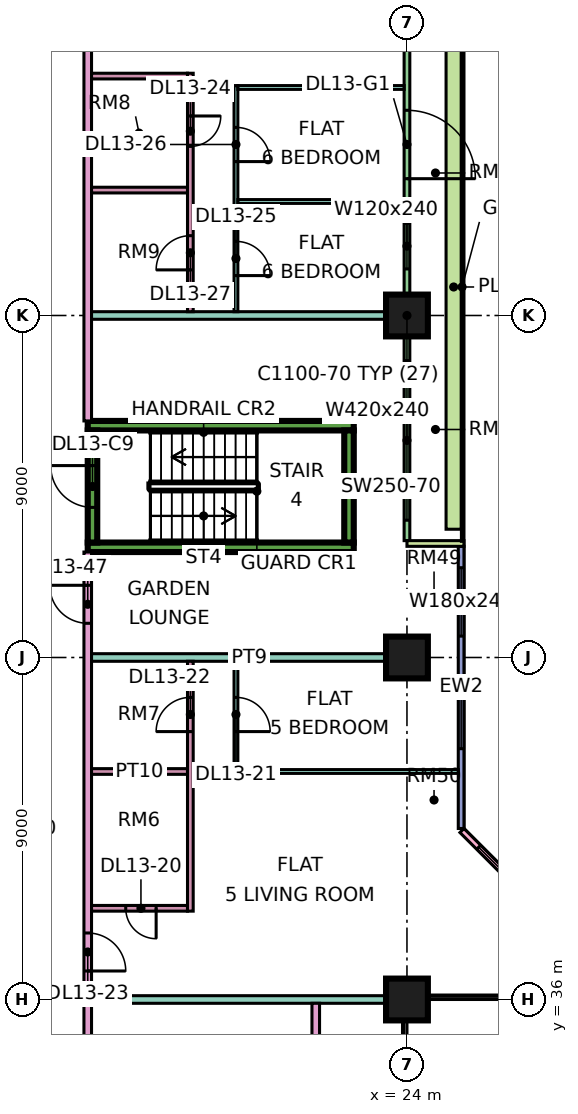
"""IFC4 building model, lengths in metres.
Left out: names, types, materials, properties, quantities, classifications, styles, units other than length and angle.
Written with IfcOpenShell. Run it as: python <this file> out.ifc"""

import sys

from ifc_helpers import new_model, si_unit, direction, frame, frame_2d, origin, origin_2d, place, context, subcontext, project, spatial, rectangle, extrude, element, fill, save


model = new_model("IFC4")
c1 = context("Model", 3, precision=1e-05, world=origin(), true_north=direction((0.0, 1.0)))
c2 = subcontext(c1, "Body", "Model", "MODEL_VIEW")
j1 = project(units=[si_unit("LENGTHUNIT", "METRE"), si_unit("PLANEANGLEUNIT", "RADIAN")], contexts=[c1])
p1 = place(None, origin())
s1 = spatial("IfcSite", under=j1, at=p1, CompositionType="ELEMENT")
p2 = place(p1, origin())
s2 = spatial("IfcBuilding", under=s1, at=p2, CompositionType="ELEMENT")
p3 = place(p2, frame((0.0, 0.0, 63.9)))
s3 = spatial("IfcBuildingStorey", under=s2, at=p3, CompositionType="ELEMENT", Elevation=63.9)
for number, where, z_axis, x_axis in (
    (1, (24.0, 36.0, 0.0), (0.0, 0.0, 1.0), (1.0, 0.0, 0.0)),
    (2, (24.0, 45.0, 0.0), (0.0, 0.0, 1.0), (1.0, 0.0, 0.0)),
    (3, (24.0, 54.0, 0.0), (0.0, 0.0, 1.0), (1.0, 0.0, 0.0)),
):
    element("IfcColumn", number, at=place(p3, frame(where, z_axis=z_axis, x_axis=x_axis)), inside=s3, PredefinedType="COLUMN", context=c2, shape_type="SweptSolid", body=[
        extrude(rectangle(XDim=1.1, YDim=1.1, at=origin_2d()), origin(), (0.0, 0.0, 1.0), 3.75),
    ])
for number, where, z_axis, x_axis in (
    (4, (15.6, 47.9, 0.0), (0.0, 0.0, 1.0), (1.0, 0.0, 0.0)),
    (5, (15.6, 51.1, 0.0), (0.0, 0.0, 1.0), (1.0, 0.0, 0.0)),
):
    element("IfcWall", number, at=place(p3, frame(where, z_axis=z_axis, x_axis=x_axis)), inside=s3, PredefinedType="SHEAR", context=c2, shape_type="SweptSolid", body=[
        extrude(rectangle(XDim=7.0, YDim=0.25, at=frame_2d((3.5, 0.0))), origin(), (0.0, 0.0, 1.0), 3.75),
    ])
p4 = place(p3, frame((15.725, 48.025, 0.0), z_axis=(0.0, 0.0, 1.0), x_axis=(0.0, 1.0, 0.0)))
e6 = element("IfcWall", 6, at=p4, inside=s3, PredefinedType="SHEAR", context=c2, shape_type="SweptSolid", body=[
    extrude(rectangle(XDim=2.95, YDim=0.25, at=frame_2d((1.475, 0.0))), origin(), (0.0, 0.0, 1.0), 3.75),
])
p5 = place(p4, frame((0.925, 0.0, 0.0)))
e7 = element("IfcOpeningElement", 7, at=p5, cuts=e6, PredefinedType="OPENING", context=c2, shape_type="SweptSolid", body=[
    extrude(rectangle(XDim=1.1, YDim=2.2, at=frame_2d((0.55, 1.1))), frame((0.0, 0.135, 0.0), z_axis=(0.0, -1.0, 0.0), x_axis=(1.0, 0.0, 0.0)), (0.0, 0.0, 1.0), 0.27),
])
p6 = place(p3, frame((22.475, 48.025, 0.0), z_axis=(0.0, 0.0, 1.0), x_axis=(0.0, 1.0, 0.0)))
e8 = element("IfcWall", 8, at=p6, inside=s3, PredefinedType="SHEAR", context=c2, shape_type="SweptSolid", body=[
    extrude(rectangle(XDim=2.95, YDim=0.25, at=frame_2d((1.475, 0.0))), origin(), (0.0, 0.0, 1.0), 3.75),
])
p7 = place(p3, frame((28.447, 37.447, 0.0), z_axis=(0.0, 0.0, 1.0), x_axis=(-0.707106781187, 0.707106781187, 0.0)))
e9 = element("IfcWall", 9, at=p7, inside=s3, PredefinedType="SOLIDWALL", context=c2, shape_type="SweptSolid", body=[
    extrude(rectangle(XDim=4.243, YDim=0.15, at=frame_2d((2.121, 0.0))), origin(), (0.0, 0.0, 1.0), 3.35),
])
p8 = place(p7, frame((0.621, 0.0, 0.45)))
e10 = element("IfcOpeningElement", 10, at=p8, cuts=e9, PredefinedType="OPENING", context=c2, shape_type="SweptSolid", body=[
    extrude(rectangle(XDim=3.0, YDim=2.4, at=frame_2d((1.5, 1.2))), frame((0.0, 0.085, 0.0), z_axis=(0.0, -1.0, 0.0), x_axis=(1.0, 0.0, 0.0)), (0.0, 0.0, 1.0), 0.17),
])
p9 = place(p3, frame((25.425, 40.5, 0.0), z_axis=(0.0, 0.0, 1.0), x_axis=(0.0, 1.0, 0.0)))
e11 = element("IfcWall", 11, at=p9, inside=s3, PredefinedType="SOLIDWALL", context=c2, shape_type="SweptSolid", body=[
    extrude(rectangle(XDim=7.425, YDim=0.15, at=frame_2d((3.712, 0.0))), origin(), (0.0, 0.0, 1.0), 3.35),
])
p10 = place(p9, frame((2.1, 0.0, 0.45)))
e12 = element("IfcOpeningElement", 12, at=p10, cuts=e11, PredefinedType="OPENING", context=c2, shape_type="SweptSolid", body=[
    extrude(rectangle(XDim=1.8, YDim=2.4, at=frame_2d((0.9, 1.2))), frame((0.0, 0.085, 0.0), z_axis=(0.0, -1.0, 0.0), x_axis=(1.0, 0.0, 0.0)), (0.0, 0.0, 1.0), 0.17),
])
p11 = place(p9, frame((5.062, 0.0, 0.45)))
e13 = element("IfcOpeningElement", 13, at=p11, cuts=e11, PredefinedType="OPENING", context=c2, shape_type="SweptSolid", body=[
    extrude(rectangle(XDim=1.8, YDim=2.4, at=frame_2d((0.9, 1.2))), frame((0.0, 0.085, 0.0), z_axis=(0.0, -1.0, 0.0), x_axis=(1.0, 0.0, 0.0)), (0.0, 0.0, 1.0), 0.17),
])
p12 = place(p3, frame((24.0, 48.075, 0.0), z_axis=(0.0, 0.0, 1.0), x_axis=(0.0, 1.0, 0.0)))
e14 = element("IfcWall", 14, at=p12, inside=s3, PredefinedType="SOLIDWALL", context=c2, shape_type="SweptSolid", body=[
    extrude(rectangle(XDim=13.35, YDim=0.15, at=frame_2d((6.675, 0.0))), origin(), (0.0, 0.0, 1.0), 3.35),
])
p13 = place(p12, frame((0.538, 0.0, 0.45)))
e15 = element("IfcOpeningElement", 15, at=p13, cuts=e14, PredefinedType="OPENING", context=c2, shape_type="SweptSolid", body=[
    extrude(rectangle(XDim=4.2, YDim=2.4, at=frame_2d((2.1, 1.2))), frame((0.0, 0.085, 0.0), z_axis=(0.0, -1.0, 0.0), x_axis=(1.0, 0.0, 0.0)), (0.0, 0.0, 1.0), 0.17),
])
p14 = place(p12, frame((7.15, 0.0, 0.45)))
e16 = element("IfcOpeningElement", 16, at=p14, cuts=e14, PredefinedType="OPENING", context=c2, shape_type="SweptSolid", body=[
    extrude(rectangle(XDim=1.2, YDim=2.4, at=frame_2d((0.6, 1.2))), frame((0.0, 0.085, 0.0), z_axis=(0.0, -1.0, 0.0), x_axis=(1.0, 0.0, 0.0)), (0.0, 0.0, 1.0), 0.17),
])
p15 = place(p12, frame((9.525, 0.0, 0.0)))
e17 = element("IfcOpeningElement", 17, at=p15, cuts=e14, PredefinedType="OPENING", context=c2, shape_type="SweptSolid", body=[
    extrude(rectangle(XDim=1.8, YDim=2.4, at=frame_2d((0.9, 1.2))), frame((0.0, 0.085, 0.0), z_axis=(0.0, -1.0, 0.0), x_axis=(1.0, 0.0, 0.0)), (0.0, 0.0, 1.0), 0.17),
])
p16 = place(p3, frame((25.5, 48.0, 0.0), z_axis=(0.0, 0.0, 1.0), x_axis=(-1.0, 0.0, 0.0)))
e18 = element("IfcWall", 18, at=p16, inside=s3, PredefinedType="SOLIDWALL", context=c2, shape_type="SweptSolid", body=[
    extrude(rectangle(XDim=1.5, YDim=0.15, at=frame_2d((0.75, 0.0))), origin(), (0.0, 0.0, 1.0), 3.35),
])
p17 = place(p3, frame((25.229, 48.375, 0.0), z_axis=(0.0, 0.0, 1.0), x_axis=(0.0, 1.0, 0.0)))
e19 = element("IfcWall", 19, at=p17, inside=s3, PredefinedType="SOLIDWALL", context=c2, shape_type="SweptSolid", body=[
    extrude(rectangle(XDim=12.75, YDim=0.4, at=frame_2d((6.375, 0.0))), origin(), (0.0, 0.0, 1.0), 0.7),
])
p18 = place(p3, frame((15.6, 20.0, 0.0), z_axis=(0.0, 0.0, 1.0), x_axis=(0.0, 1.0, 0.0)))
e20 = element("IfcWall", 20, at=p18, inside=s3, PredefinedType="PARTITIONING", context=c2, shape_type="SweptSolid", body=[
    extrude(rectangle(XDim=27.775, YDim=0.2, at=frame_2d((13.887, 0.0))), origin(), (0.0, 0.0, 1.0), 3.35),
])
p19 = place(p18, frame((6.55, 0.0, 0.0)))
e21 = element("IfcOpeningElement", 21, at=p19, cuts=e20, PredefinedType="OPENING", context=c2, shape_type="SweptSolid", body=[
    extrude(rectangle(XDim=1.0, YDim=2.1, at=frame_2d((0.5, 1.05))), frame((0.0, 0.11, 0.0), z_axis=(0.0, -1.0, 0.0), x_axis=(1.0, 0.0, 0.0)), (0.0, 0.0, 1.0), 0.22),
])
p20 = place(p18, frame((12.25, 0.0, 0.0)))
e22 = element("IfcOpeningElement", 22, at=p20, cuts=e20, PredefinedType="OPENING", context=c2, shape_type="SweptSolid", body=[
    extrude(rectangle(XDim=1.6, YDim=2.1, at=frame_2d((0.8, 1.05))), frame((0.0, 0.11, 0.0), z_axis=(0.0, -1.0, 0.0), x_axis=(1.0, 0.0, 0.0)), (0.0, 0.0, 1.0), 0.22),
])
p21 = place(p18, frame((16.75, 0.0, 0.0)))
e23 = element("IfcOpeningElement", 23, at=p21, cuts=e20, PredefinedType="OPENING", context=c2, shape_type="SweptSolid", body=[
    extrude(rectangle(XDim=1.0, YDim=2.1, at=frame_2d((0.5, 1.05))), frame((0.0, 0.11, 0.0), z_axis=(0.0, -1.0, 0.0), x_axis=(1.0, 0.0, 0.0)), (0.0, 0.0, 1.0), 0.22),
])
p22 = place(p18, frame((1.15, 0.0, 0.0)))
e24 = element("IfcOpeningElement", 24, at=p22, cuts=e20, PredefinedType="OPENING", context=c2, shape_type="SweptSolid", body=[
    extrude(rectangle(XDim=1.8, YDim=2.1, at=frame_2d((0.9, 1.05))), frame((0.0, 0.11, 0.0), z_axis=(0.0, -1.0, 0.0), x_axis=(1.0, 0.0, 0.0)), (0.0, 0.0, 1.0), 0.22),
])
p23 = place(p18, frame((25.9, 0.0, 0.0)))
e25 = element("IfcOpeningElement", 25, at=p23, cuts=e20, PredefinedType="OPENING", context=c2, shape_type="SweptSolid", body=[
    extrude(rectangle(XDim=1.0, YDim=2.1, at=frame_2d((0.5, 1.05))), frame((0.0, 0.11, 0.0), z_axis=(0.0, -1.0, 0.0), x_axis=(1.0, 0.0, 0.0)), (0.0, 0.0, 1.0), 0.22),
])
p24 = place(p3, frame((15.6, 51.225, 0.0), z_axis=(0.0, 0.0, 1.0), x_axis=(0.0, 1.0, 0.0)))
e26 = element("IfcWall", 26, at=p24, inside=s3, PredefinedType="PARTITIONING", context=c2, shape_type="SweptSolid", body=[
    extrude(rectangle(XDim=13.125, YDim=0.2, at=frame_2d((6.562, 0.0))), origin(), (0.0, 0.0, 1.0), 3.35),
])
p25 = place(p24, frame((9.975, 0.0, 0.0)))
e27 = element("IfcOpeningElement", 27, at=p25, cuts=e26, PredefinedType="OPENING", context=c2, shape_type="SweptSolid", body=[
    extrude(rectangle(XDim=1.0, YDim=2.1, at=frame_2d((0.5, 1.05))), frame((0.0, 0.11, 0.0), z_axis=(0.0, -1.0, 0.0), x_axis=(1.0, 0.0, 0.0)), (0.0, 0.0, 1.0), 0.22),
])
p26 = place(p3, frame((15.7, 36.0, 0.0), z_axis=(0.0, 0.0, 1.0), x_axis=(1.0, 0.0, 0.0)))
e28 = element("IfcWall", 28, at=p26, inside=s3, PredefinedType="PARTITIONING", context=c2, shape_type="SweptSolid", body=[
    extrude(rectangle(XDim=8.3, YDim=0.2, at=frame_2d((4.15, 0.0))), origin(), (0.0, 0.0, 1.0), 3.35),
])
p27 = place(p3, frame((15.7, 38.4, 0.0), z_axis=(0.0, 0.0, 1.0), x_axis=(1.0, 0.0, 0.0)))
e29 = element("IfcWall", 29, at=p27, inside=s3, PredefinedType="PARTITIONING", context=c2, shape_type="SweptSolid", body=[
    extrude(rectangle(XDim=2.525, YDim=0.15, at=frame_2d((1.263, 0.0))), origin(), (0.0, 0.0, 1.0), 3.35),
])
p28 = place(p27, frame((0.9, 0.0, 0.0)))
e30 = element("IfcOpeningElement", 30, at=p28, cuts=e29, PredefinedType="OPENING", context=c2, shape_type="SweptSolid", body=[
    extrude(rectangle(XDim=0.8, YDim=2.1, at=frame_2d((0.4, 1.05))), frame((0.0, 0.085, 0.0), z_axis=(0.0, -1.0, 0.0), x_axis=(1.0, 0.0, 0.0)), (0.0, 0.0, 1.0), 0.17),
])
p29 = place(p3, frame((15.7, 42.0, 0.0), z_axis=(0.0, 0.0, 1.0), x_axis=(1.0, 0.0, 0.0)))
e31 = element("IfcWall", 31, at=p29, inside=s3, PredefinedType="PARTITIONING", context=c2, shape_type="SweptSolid", body=[
    extrude(rectangle(XDim=2.525, YDim=0.15, at=frame_2d((1.263, 0.0))), origin(), (0.0, 0.0, 1.0), 3.35),
])
p30 = place(p3, frame((15.7, 45.0, 0.0), z_axis=(0.0, 0.0, 1.0), x_axis=(1.0, 0.0, 0.0)))
e32 = element("IfcWall", 32, at=p30, inside=s3, PredefinedType="PARTITIONING", context=c2, shape_type="SweptSolid", body=[
    extrude(rectangle(XDim=8.3, YDim=0.2, at=frame_2d((4.15, 0.0))), origin(), (0.0, 0.0, 1.0), 3.35),
])
p31 = place(p3, frame((15.7, 54.0, 0.0), z_axis=(0.0, 0.0, 1.0), x_axis=(1.0, 0.0, 0.0)))
e33 = element("IfcWall", 33, at=p31, inside=s3, PredefinedType="PARTITIONING", context=c2, shape_type="SweptSolid", body=[
    extrude(rectangle(XDim=8.226, YDim=0.2, at=frame_2d((4.113, 0.0))), origin(), (0.0, 0.0, 1.0), 3.35),
])
for number, where, z_axis, x_axis in (
    (34, (15.7, 57.3, 0.0), (0.0, 0.0, 1.0), (1.0, 0.0, 0.0)),
    (35, (15.7, 60.3, 0.0), (0.0, 0.0, 1.0), (1.0, 0.0, 0.0)),
):
    element("IfcWall", number, at=place(p3, frame(where, z_axis=z_axis, x_axis=x_axis)), inside=s3, PredefinedType="PARTITIONING", context=c2, shape_type="SweptSolid", body=[
        extrude(rectangle(XDim=2.525, YDim=0.15, at=frame_2d((1.263, 0.0))), origin(), (0.0, 0.0, 1.0), 3.35),
    ])
p32 = place(p3, frame((18.3, 38.325, 0.0), z_axis=(0.0, 0.0, 1.0), x_axis=(0.0, 1.0, 0.0)))
e36 = element("IfcWall", 36, at=p32, inside=s3, PredefinedType="PARTITIONING", context=c2, shape_type="SweptSolid", body=[
    extrude(rectangle(XDim=6.575, YDim=0.15, at=frame_2d((3.288, 0.0))), origin(), (0.0, 0.0, 1.0), 3.35),
])
p33 = place(p32, frame((4.725, 0.0, 0.0)))
e37 = element("IfcOpeningElement", 37, at=p33, cuts=e36, PredefinedType="OPENING", context=c2, shape_type="SweptSolid", body=[
    extrude(rectangle(XDim=0.9, YDim=2.1, at=frame_2d((0.45, 1.05))), frame((0.0, 0.085, 0.0), z_axis=(0.0, -1.0, 0.0), x_axis=(1.0, 0.0, 0.0)), (0.0, 0.0, 1.0), 0.17),
])
p34 = place(p3, frame((18.3, 54.1, 0.0), z_axis=(0.0, 0.0, 1.0), x_axis=(0.0, 1.0, 0.0)))
e38 = element("IfcWall", 38, at=p34, inside=s3, PredefinedType="PARTITIONING", context=c2, shape_type="SweptSolid", body=[
    extrude(rectangle(XDim=6.275, YDim=0.15, at=frame_2d((3.137, 0.0))), origin(), (0.0, 0.0, 1.0), 3.35),
])
p35 = place(p34, frame((4.35, 0.0, 0.0)))
e39 = element("IfcOpeningElement", 39, at=p35, cuts=e38, PredefinedType="OPENING", context=c2, shape_type="SweptSolid", body=[
    extrude(rectangle(XDim=0.8, YDim=2.1, at=frame_2d((0.4, 1.05))), frame((0.0, 0.085, 0.0), z_axis=(0.0, -1.0, 0.0), x_axis=(1.0, 0.0, 0.0)), (0.0, 0.0, 1.0), 0.17),
])
p36 = place(p34, frame((1.1, 0.0, 0.0)))
e40 = element("IfcOpeningElement", 40, at=p36, cuts=e38, PredefinedType="OPENING", context=c2, shape_type="SweptSolid", body=[
    extrude(rectangle(XDim=0.9, YDim=2.1, at=frame_2d((0.45, 1.05))), frame((0.0, 0.085, 0.0), z_axis=(0.0, -1.0, 0.0), x_axis=(1.0, 0.0, 0.0)), (0.0, 0.0, 1.0), 0.17),
])
p37 = place(p3, frame((19.45, 42.0, 0.0), z_axis=(0.0, 0.0, 1.0), x_axis=(1.0, 0.0, 0.0)))
e41 = element("IfcWall", 41, at=p37, inside=s3, PredefinedType="PARTITIONING", context=c2, shape_type="SweptSolid", body=[
    extrude(rectangle(XDim=5.9, YDim=0.1, at=frame_2d((2.95, 0.0))), origin(), (0.0, 0.0, 1.0), 3.35),
])
p38 = place(p3, frame((19.5, 42.05, 0.0), z_axis=(0.0, 0.0, 1.0), x_axis=(0.0, 1.0, 0.0)))
e42 = element("IfcWall", 42, at=p38, inside=s3, PredefinedType="PARTITIONING", context=c2, shape_type="SweptSolid", body=[
    extrude(rectangle(XDim=2.85, YDim=0.1, at=frame_2d((1.425, 0.0))), origin(), (0.0, 0.0, 1.0), 3.35),
])
p39 = place(p38, frame((1.0, 0.0, 0.0)))
e43 = element("IfcOpeningElement", 43, at=p39, cuts=e42, PredefinedType="OPENING", context=c2, shape_type="SweptSolid", body=[
    extrude(rectangle(XDim=0.9, YDim=2.1, at=frame_2d((0.45, 1.05))), frame((0.0, 0.06, 0.0), z_axis=(0.0, -1.0, 0.0), x_axis=(1.0, 0.0, 0.0)), (0.0, 0.0, 1.0), 0.12),
])
p40 = place(p3, frame((19.5, 54.1, 0.0), z_axis=(0.0, 0.0, 1.0), x_axis=(0.0, 1.0, 0.0)))
e44 = element("IfcWall", 44, at=p40, inside=s3, PredefinedType="PARTITIONING", context=c2, shape_type="SweptSolid", body=[
    extrude(rectangle(XDim=5.95, YDim=0.1, at=frame_2d((2.975, 0.0))), origin(), (0.0, 0.0, 1.0), 3.35),
])
p41 = place(p40, frame((0.95, 0.0, 0.0)))
e45 = element("IfcOpeningElement", 45, at=p41, cuts=e44, PredefinedType="OPENING", context=c2, shape_type="SweptSolid", body=[
    extrude(rectangle(XDim=0.9, YDim=2.1, at=frame_2d((0.45, 1.05))), frame((0.0, 0.06, 0.0), z_axis=(0.0, -1.0, 0.0), x_axis=(1.0, 0.0, 0.0)), (0.0, 0.0, 1.0), 0.12),
])
p42 = place(p40, frame((3.95, 0.0, 0.0)))
e46 = element("IfcOpeningElement", 46, at=p42, cuts=e44, PredefinedType="OPENING", context=c2, shape_type="SweptSolid", body=[
    extrude(rectangle(XDim=0.9, YDim=2.1, at=frame_2d((0.45, 1.05))), frame((0.0, 0.06, 0.0), z_axis=(0.0, -1.0, 0.0), x_axis=(1.0, 0.0, 0.0)), (0.0, 0.0, 1.0), 0.12),
])
for number, where, z_axis, x_axis in (
    (47, (19.55, 57.0, 0.0), (0.0, 0.0, 1.0), (1.0, 0.0, 0.0)),
    (48, (19.55, 60.0, 0.0), (0.0, 0.0, 1.0), (1.0, 0.0, 0.0)),
):
    element("IfcWall", number, at=place(p3, frame(where, z_axis=z_axis, x_axis=x_axis)), inside=s3, PredefinedType="PARTITIONING", context=c2, shape_type="SweptSolid", body=[
        extrude(rectangle(XDim=4.376, YDim=0.1, at=frame_2d((2.188, 0.0))), origin(), (0.0, 0.0, 1.0), 3.35),
    ])
p43 = place(p3, frame((21.6, 23.9, 0.0), z_axis=(0.0, 0.0, 1.0), x_axis=(0.0, 1.0, 0.0)))
e49 = element("IfcWall", 49, at=p43, inside=s3, PredefinedType="PARTITIONING", context=c2, shape_type="SweptSolid", body=[
    extrude(rectangle(XDim=12.0, YDim=0.2, at=frame_2d((6.0, 0.0))), origin(), (0.0, 0.0, 1.0), 3.35),
])
p44 = place(p8, origin())
e50 = element("IfcWindow", 50, at=p44, inside=s3, PartitioningType="SINGLE_PANEL", PredefinedType="WINDOW", context=c2, shape_type="SweptSolid", body=[
    extrude(rectangle(XDim=3.0, YDim=2.4, at=frame_2d((1.5, 1.2))), frame((0.0, 0.03, 0.0), z_axis=(0.0, -1.0, 0.0), x_axis=(1.0, 0.0, 0.0)), (0.0, 0.0, 1.0), 0.06),
])
fill(e10, e50)
p45 = place(p10, origin())
e51 = element("IfcWindow", 51, at=p45, inside=s3, PartitioningType="SINGLE_PANEL", PredefinedType="WINDOW", context=c2, shape_type="SweptSolid", body=[
    extrude(rectangle(XDim=1.8, YDim=2.4, at=frame_2d((0.9, 1.2))), frame((0.0, 0.03, 0.0), z_axis=(0.0, -1.0, 0.0), x_axis=(1.0, 0.0, 0.0)), (0.0, 0.0, 1.0), 0.06),
])
fill(e12, e51)
p46 = place(p11, origin())
e52 = element("IfcWindow", 52, at=p46, inside=s3, PartitioningType="SINGLE_PANEL", PredefinedType="WINDOW", context=c2, shape_type="SweptSolid", body=[
    extrude(rectangle(XDim=1.8, YDim=2.4, at=frame_2d((0.9, 1.2))), frame((0.0, 0.03, 0.0), z_axis=(0.0, -1.0, 0.0), x_axis=(1.0, 0.0, 0.0)), (0.0, 0.0, 1.0), 0.06),
])
fill(e13, e52)
p47 = place(p13, origin())
e53 = element("IfcWindow", 53, at=p47, inside=s3, PartitioningType="SINGLE_PANEL", PredefinedType="WINDOW", context=c2, shape_type="SweptSolid", body=[
    extrude(rectangle(XDim=4.2, YDim=2.4, at=frame_2d((2.1, 1.2))), frame((0.0, 0.03, 0.0), z_axis=(0.0, -1.0, 0.0), x_axis=(1.0, 0.0, 0.0)), (0.0, 0.0, 1.0), 0.06),
])
fill(e15, e53)
p48 = place(p14, origin())
e54 = element("IfcWindow", 54, at=p48, inside=s3, PartitioningType="SINGLE_PANEL", PredefinedType="WINDOW", context=c2, shape_type="SweptSolid", body=[
    extrude(rectangle(XDim=1.2, YDim=2.4, at=frame_2d((0.6, 1.2))), frame((0.0, 0.03, 0.0), z_axis=(0.0, -1.0, 0.0), x_axis=(1.0, 0.0, 0.0)), (0.0, 0.0, 1.0), 0.06),
])
fill(e16, e54)
p49 = place(p15, frame((1.8, 0.0, 0.0), z_axis=(0.0, 0.0, 1.0), x_axis=(-1.0, 0.0, 0.0)))
e55 = element("IfcDoor", 55, at=p49, inside=s3, OperationType="DOUBLE_DOOR_SINGLE_SWING", PredefinedType="DOOR", context=c2, shape_type="SweptSolid", body=[
    extrude(rectangle(XDim=1.8, YDim=2.4, at=frame_2d((0.9, 1.2))), frame((0.0, 0.025, 0.0), z_axis=(0.0, -1.0, 0.0), x_axis=(1.0, 0.0, 0.0)), (0.0, 0.0, 1.0), 0.05),
])
fill(e17, e55)
p50 = place(p5, frame((1.1, 0.0, 0.0), z_axis=(0.0, 0.0, 1.0), x_axis=(-1.0, 0.0, 0.0)))
e56 = element("IfcDoor", 56, at=p50, inside=s3, OperationType="SINGLE_SWING_RIGHT", PredefinedType="DOOR", context=c2, shape_type="SweptSolid", body=[
    extrude(rectangle(XDim=1.1, YDim=2.2, at=frame_2d((0.55, 1.1))), frame((0.0, 0.025, 0.0), z_axis=(0.0, -1.0, 0.0), x_axis=(1.0, 0.0, 0.0)), (0.0, 0.0, 1.0), 0.05),
])
fill(e7, e56)
p51 = place(p28, origin())
e57 = element("IfcDoor", 57, at=p51, inside=s3, OperationType="SINGLE_SWING_RIGHT", PredefinedType="DOOR", context=c2, shape_type="SweptSolid", body=[
    extrude(rectangle(XDim=0.8, YDim=2.1, at=frame_2d((0.4, 1.05))), frame((0.0, 0.025, 0.0), z_axis=(0.0, -1.0, 0.0), x_axis=(1.0, 0.0, 0.0)), (0.0, 0.0, 1.0), 0.05),
])
fill(e30, e57)
p52 = place(p39, frame((0.9, 0.0, 0.0), z_axis=(0.0, 0.0, 1.0), x_axis=(-1.0, 0.0, 0.0)))
e58 = element("IfcDoor", 58, at=p52, inside=s3, OperationType="SINGLE_SWING_LEFT", PredefinedType="DOOR", context=c2, shape_type="SweptSolid", body=[
    extrude(rectangle(XDim=0.9, YDim=2.1, at=frame_2d((0.45, 1.05))), frame((0.0, 0.025, 0.0), z_axis=(0.0, -1.0, 0.0), x_axis=(1.0, 0.0, 0.0)), (0.0, 0.0, 1.0), 0.05),
])
fill(e43, e58)
p53 = place(p33, origin())
e59 = element("IfcDoor", 59, at=p53, inside=s3, OperationType="SINGLE_SWING_LEFT", PredefinedType="DOOR", context=c2, shape_type="SweptSolid", body=[
    extrude(rectangle(XDim=0.9, YDim=2.1, at=frame_2d((0.45, 1.05))), frame((0.0, 0.025, 0.0), z_axis=(0.0, -1.0, 0.0), x_axis=(1.0, 0.0, 0.0)), (0.0, 0.0, 1.0), 0.05),
])
fill(e37, e59)
p54 = place(p21, frame((1.0, 0.0, 0.0), z_axis=(0.0, 0.0, 1.0), x_axis=(-1.0, 0.0, 0.0)))
e60 = element("IfcDoor", 60, at=p54, inside=s3, OperationType="SINGLE_SWING_LEFT", PredefinedType="DOOR", context=c2, shape_type="SweptSolid", body=[
    extrude(rectangle(XDim=1.0, YDim=2.1, at=frame_2d((0.5, 1.05))), frame((0.0, 0.025, 0.0), z_axis=(0.0, -1.0, 0.0), x_axis=(1.0, 0.0, 0.0)), (0.0, 0.0, 1.0), 0.05),
])
fill(e23, e60)
p55 = place(p35, origin())
e61 = element("IfcDoor", 61, at=p55, inside=s3, OperationType="SINGLE_SWING_RIGHT", PredefinedType="DOOR", context=c2, shape_type="SweptSolid", body=[
    extrude(rectangle(XDim=0.8, YDim=2.1, at=frame_2d((0.4, 1.05))), frame((0.0, 0.025, 0.0), z_axis=(0.0, -1.0, 0.0), x_axis=(1.0, 0.0, 0.0)), (0.0, 0.0, 1.0), 0.05),
])
fill(e39, e61)
p56 = place(p41, frame((0.9, 0.0, 0.0), z_axis=(0.0, 0.0, 1.0), x_axis=(-1.0, 0.0, 0.0)))
e62 = element("IfcDoor", 62, at=p56, inside=s3, OperationType="SINGLE_SWING_LEFT", PredefinedType="DOOR", context=c2, shape_type="SweptSolid", body=[
    extrude(rectangle(XDim=0.9, YDim=2.1, at=frame_2d((0.45, 1.05))), frame((0.0, 0.025, 0.0), z_axis=(0.0, -1.0, 0.0), x_axis=(1.0, 0.0, 0.0)), (0.0, 0.0, 1.0), 0.05),
])
fill(e45, e62)
p57 = place(p42, frame((0.9, 0.0, 0.0), z_axis=(0.0, 0.0, 1.0), x_axis=(-1.0, 0.0, 0.0)))
e63 = element("IfcDoor", 63, at=p57, inside=s3, OperationType="SINGLE_SWING_LEFT", PredefinedType="DOOR", context=c2, shape_type="SweptSolid", body=[
    extrude(rectangle(XDim=0.9, YDim=2.1, at=frame_2d((0.45, 1.05))), frame((0.0, 0.025, 0.0), z_axis=(0.0, -1.0, 0.0), x_axis=(1.0, 0.0, 0.0)), (0.0, 0.0, 1.0), 0.05),
])
fill(e46, e63)
p58 = place(p36, origin())
e64 = element("IfcDoor", 64, at=p58, inside=s3, OperationType="SINGLE_SWING_LEFT", PredefinedType="DOOR", context=c2, shape_type="SweptSolid", body=[
    extrude(rectangle(XDim=0.9, YDim=2.1, at=frame_2d((0.45, 1.05))), frame((0.0, 0.025, 0.0), z_axis=(0.0, -1.0, 0.0), x_axis=(1.0, 0.0, 0.0)), (0.0, 0.0, 1.0), 0.05),
])
fill(e40, e64)
p59 = place(p23, frame((1.0, 0.0, 0.0), z_axis=(0.0, 0.0, 1.0), x_axis=(-1.0, 0.0, 0.0)))
e65 = element("IfcDoor", 65, at=p59, inside=s3, OperationType="SINGLE_SWING_RIGHT", PredefinedType="DOOR", context=c2, shape_type="SweptSolid", body=[
    extrude(rectangle(XDim=1.0, YDim=2.1, at=frame_2d((0.5, 1.05))), frame((0.0, 0.025, 0.0), z_axis=(0.0, -1.0, 0.0), x_axis=(1.0, 0.0, 0.0)), (0.0, 0.0, 1.0), 0.05),
])
fill(e25, e65)
save(model, sys.argv[1])
